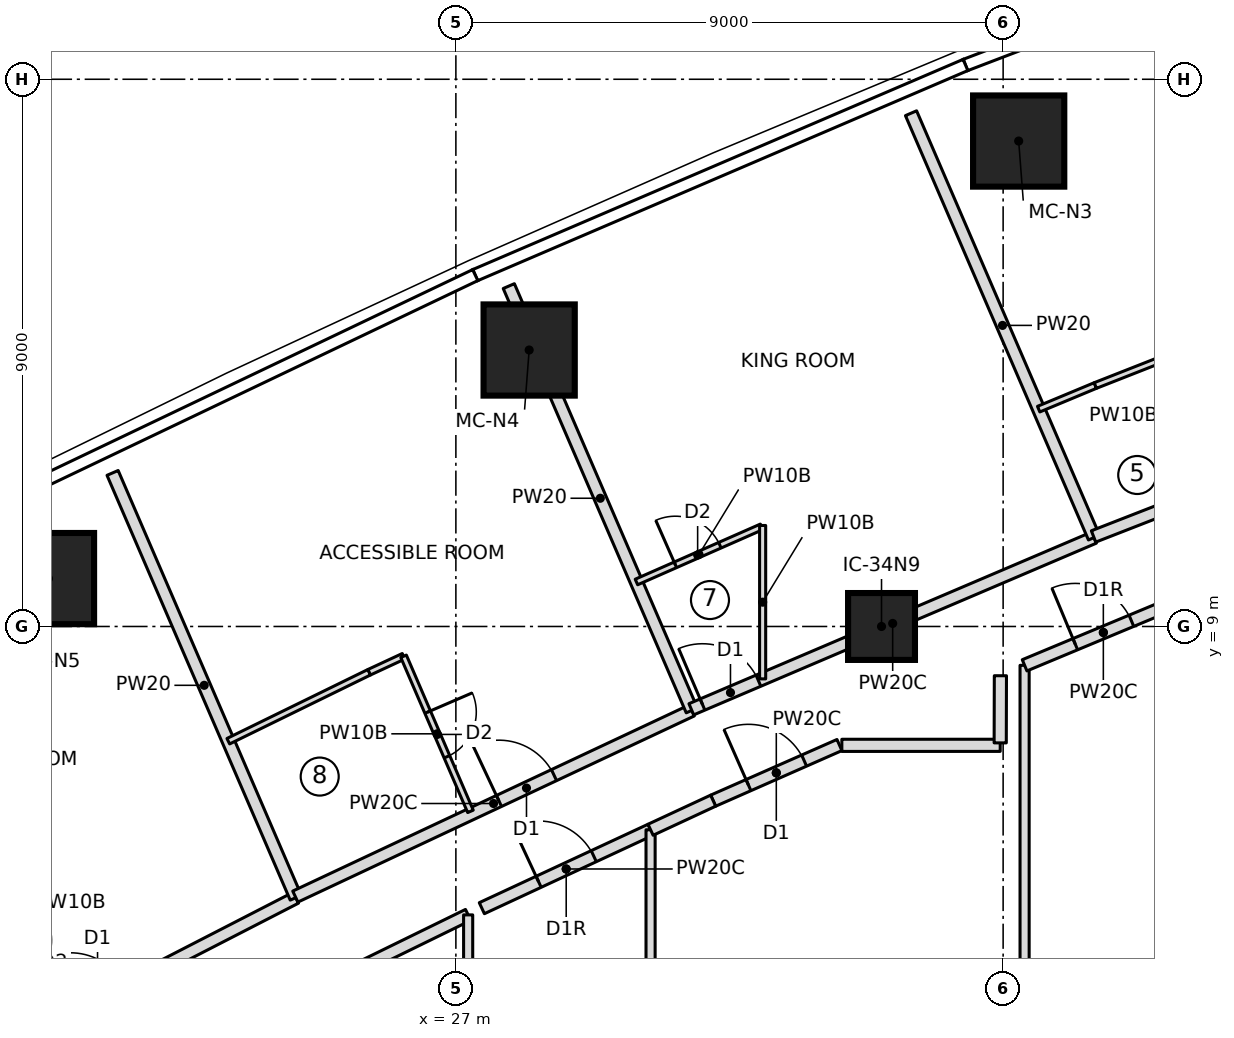
"""IFC4 building model, lengths in metres.
Left out: names, types, materials, properties, quantities, classifications, styles, units other than length and angle.
Written with IfcOpenShell. Run it as: python <this file> out.ifc"""

import sys

from ifc_helpers import new_model, si_unit, direction, frame, frame_2d, origin, origin_2d, place, context, subcontext, project, spatial, rectangle, extrude, element, fill, save


model = new_model("IFC4")
c1 = context("Model", 3, precision=1e-05, world=origin(), true_north=direction((0.0, 1.0)))
c2 = subcontext(c1, "Body", "Model", "MODEL_VIEW")
j1 = project(units=[si_unit("LENGTHUNIT", "METRE"), si_unit("PLANEANGLEUNIT", "RADIAN")], contexts=[c1])
p1 = place(None, origin())
s1 = spatial("IfcSite", under=j1, at=p1, CompositionType="ELEMENT")
p2 = place(p1, origin())
s2 = spatial("IfcBuilding", under=s1, at=p2, CompositionType="ELEMENT")
p3 = place(p2, frame((0.0, 0.0, 144.4)))
s3 = spatial("IfcBuildingStorey", under=s2, at=p3, CompositionType="ELEMENT", Elevation=144.4)
for number, where, z_axis, x_axis in (
    (1, (36.256, 16.984, 0.0), (0.0, 0.0, 1.0), (1.0, 0.0, 0.0)),
    (2, (28.205, 13.547, 0.0), (0.0, 0.0, 1.0), (1.0, 0.0, 0.0)),
    (3, (20.3, 9.788, 0.0), (0.0, 0.0, 1.0), (1.0, 0.0, 0.0)),
):
    element("IfcColumn", number, at=place(p3, frame(where, z_axis=z_axis, x_axis=x_axis)), inside=s3, PredefinedType="COLUMN", context=c2, shape_type="SweptSolid", body=[
        extrude(rectangle(XDim=1.5, YDim=1.5, at=origin_2d()), origin(), (0.0, 0.0, 1.0), 3.55),
    ])
p4 = place(p3, frame((34.0, 9.0, 0.0), z_axis=(0.0, 0.0, 1.0), x_axis=(1.0, 0.0, 0.0)))
e4 = element("IfcColumn", 4, at=p4, inside=s3, PredefinedType="COLUMN", context=c2, shape_type="SweptSolid", body=[
    extrude(rectangle(XDim=1.1, YDim=1.1, at=origin_2d()), origin(), (0.0, 0.0, 1.0), 3.55),
])
p5 = place(p3, frame((17.95, 1.238, 0.0), z_axis=(0.0, 0.0, 1.0), x_axis=(0.889253598622, 0.457414513694, 0.0)))
e5 = element("IfcWall", 5, at=p5, inside=s3, PredefinedType="PARTITIONING", context=c2, shape_type="SweptSolid", body=[
    extrude(rectangle(XDim=7.217, YDim=0.2, at=frame_2d((3.608, 0.0))), origin(), (0.0, 0.0, 1.0), 3.25),
])
p6 = place(p5, frame((3.05, 0.0, 0.0)))
e6 = element("IfcOpeningElement", 6, at=p6, cuts=e5, PredefinedType="OPENING", context=c2, shape_type="SweptSolid", body=[
    extrude(rectangle(XDim=1.0, YDim=2.1, at=frame_2d((0.5, 1.05))), frame((0.0, 0.11, 0.0), z_axis=(0.0, -1.0, 0.0), x_axis=(1.0, 0.0, 0.0)), (0.0, 0.0, 1.0), 0.22),
])
p7 = place(p3, frame((24.367, 4.539, 0.0), z_axis=(0.0, 0.0, 1.0), x_axis=(-0.395982367396, 0.918258114427, 0.0)))
e7 = element("IfcWall", 7, at=p7, inside=s3, PredefinedType="PARTITIONING", context=c2, shape_type="SweptSolid", body=[
    extrude(rectangle(XDim=7.609, YDim=0.2, at=frame_2d((3.804, 0.0))), origin(), (0.0, 0.0, 1.0), 3.25),
])
p8 = place(p3, frame((24.36, 4.557, 0.0), z_axis=(0.0, 0.0, 1.0), x_axis=(0.905157912263, 0.425075468439, 0.0)))
e8 = element("IfcWall", 8, at=p8, inside=s3, PredefinedType="PARTITIONING", context=c2, shape_type="SweptSolid", body=[
    extrude(rectangle(XDim=7.203, YDim=0.2, at=frame_2d((3.602, 0.0))), origin(), (0.0, 0.0, 1.0), 3.25),
])
p9 = place(p8, frame((3.7, 0.0, 0.0)))
e9 = element("IfcOpeningElement", 9, at=p9, cuts=e8, PredefinedType="OPENING", context=c2, shape_type="SweptSolid", body=[
    extrude(rectangle(XDim=1.0, YDim=2.1, at=frame_2d((0.5, 1.05))), frame((0.0, 0.11, 0.0), z_axis=(0.0, -1.0, 0.0), x_axis=(1.0, 0.0, 0.0)), (0.0, 0.0, 1.0), 0.22),
])
p10 = place(p3, frame((23.257, 7.113, 0.0), z_axis=(0.0, 0.0, 1.0), x_axis=(0.89814200952, 0.439705504555, 0.0)))
e10 = element("IfcWall", 10, at=p10, inside=s3, PredefinedType="PARTITIONING", context=c2, shape_type="SweptSolid", body=[
    extrude(rectangle(XDim=2.581, YDim=0.1, at=frame_2d((1.291, 0.0))), origin(), (0.0, 0.0, 1.0), 3.25),
])
p11 = place(p3, frame((25.575, 8.248, 0.0), z_axis=(0.0, 0.0, 1.0), x_axis=(0.906923333349, 0.421295700699, 0.0)))
e11 = element("IfcWall", 11, at=p11, inside=s3, PredefinedType="PARTITIONING", context=c2, shape_type="SweptSolid", body=[
    extrude(rectangle(XDim=0.622, YDim=0.1, at=frame_2d((0.311, 0.0))), origin(), (0.0, 0.0, 1.0), 3.25),
])
p12 = place(p3, frame((26.14, 8.51, 0.0), z_axis=(0.0, 0.0, 1.0), x_axis=(0.396018464604, -0.918242547311, 0.0)))
e12 = element("IfcWall", 12, at=p12, inside=s3, PredefinedType="PARTITIONING", context=c2, shape_type="SweptSolid", body=[
    extrude(rectangle(XDim=2.778, YDim=0.1, at=frame_2d((1.389, 0.0))), origin(), (0.0, 0.0, 1.0), 3.25),
])
p13 = place(p12, frame((1.0, 0.0, 0.0)))
e13 = element("IfcOpeningElement", 13, at=p13, cuts=e12, PredefinedType="OPENING", context=c2, shape_type="SweptSolid", body=[
    extrude(rectangle(XDim=0.8, YDim=2.1, at=frame_2d((0.4, 1.05))), frame((0.0, 0.06, 0.0), z_axis=(0.0, -1.0, 0.0), x_axis=(1.0, 0.0, 0.0)), (0.0, 0.0, 1.0), 0.12),
])
p14 = place(p3, frame((30.88, 7.619, 0.0), z_axis=(0.0, 0.0, 1.0), x_axis=(-0.395976934703, 0.91826045716, 0.0)))
e14 = element("IfcWall", 14, at=p14, inside=s3, PredefinedType="PARTITIONING", context=c2, shape_type="SweptSolid", body=[
    extrude(rectangle(XDim=7.6, YDim=0.2, at=frame_2d((3.8, 0.0))), origin(), (0.0, 0.0, 1.0), 3.25),
])
p15 = place(p3, frame((30.872, 7.638, 0.0), z_axis=(0.0, 0.0, 1.0), x_axis=(0.919834621271, 0.392306346509, 0.0)))
e15 = element("IfcWall", 15, at=p15, inside=s3, PredefinedType="PARTITIONING", context=c2, shape_type="SweptSolid", body=[
    extrude(rectangle(XDim=7.2, YDim=0.2, at=frame_2d((3.6, 0.0))), origin(), (0.0, 0.0, 1.0), 3.25),
])
p16 = place(p15, frame((0.2, 0.0, 0.0)))
e16 = element("IfcOpeningElement", 16, at=p16, cuts=e15, PredefinedType="OPENING", context=c2, shape_type="SweptSolid", body=[
    extrude(rectangle(XDim=1.0, YDim=2.1, at=frame_2d((0.5, 1.05))), frame((0.0, 0.11, 0.0), z_axis=(0.0, -1.0, 0.0), x_axis=(1.0, 0.0, 0.0)), (0.0, 0.0, 1.0), 0.22),
])
p17 = place(p3, frame((29.969, 9.731, 0.0), z_axis=(0.0, 0.0, 1.0), x_axis=(0.915118086658, 0.403185921719, 0.0)))
e17 = element("IfcWall", 17, at=p17, inside=s3, PredefinedType="PARTITIONING", context=c2, shape_type="SweptSolid", body=[
    extrude(rectangle(XDim=2.25, YDim=0.1, at=frame_2d((1.125, 0.0))), origin(), (0.0, 0.0, 1.0), 3.25),
])
p18 = place(p17, frame((0.7, 0.0, 0.0)))
e18 = element("IfcOpeningElement", 18, at=p18, cuts=e17, PredefinedType="OPENING", context=c2, shape_type="SweptSolid", body=[
    extrude(rectangle(XDim=0.8, YDim=2.1, at=frame_2d((0.4, 1.05))), frame((0.0, 0.06, 0.0), z_axis=(0.0, -1.0, 0.0), x_axis=(1.0, 0.0, 0.0)), (0.0, 0.0, 1.0), 0.12),
])
p19 = place(p3, frame((37.495, 10.462, 0.0), z_axis=(0.0, 0.0, 1.0), x_axis=(-0.396019423722, 0.918242133664, 0.0)))
e19 = element("IfcWall", 19, at=p19, inside=s3, PredefinedType="PARTITIONING", context=c2, shape_type="SweptSolid", body=[
    extrude(rectangle(XDim=7.601, YDim=0.2, at=frame_2d((3.8, 0.0))), origin(), (0.0, 0.0, 1.0), 3.25),
])
p20 = place(p3, frame((44.199, 13.098, 0.0), z_axis=(0.0, 0.0, 1.0), x_axis=(-0.931657652296, -0.363337334882, 0.0)))
e20 = element("IfcWall", 20, at=p20, inside=s3, PredefinedType="PARTITIONING", context=c2, shape_type="SweptSolid", body=[
    extrude(rectangle(XDim=7.205, YDim=0.2, at=frame_2d((3.602, 0.0))), origin(), (0.0, 0.0, 1.0), 3.25),
])
p21 = place(p20, frame((0.35, 0.0, 0.0)))
e21 = element("IfcOpeningElement", 21, at=p21, cuts=e20, PredefinedType="OPENING", context=c2, shape_type="SweptSolid", body=[
    extrude(rectangle(XDim=1.0, YDim=2.1, at=frame_2d((0.5, 1.05))), frame((0.0, 0.11, 0.0), z_axis=(0.0, -1.0, 0.0), x_axis=(1.0, 0.0, 0.0)), (0.0, 0.0, 1.0), 0.22),
])
p22 = place(p3, frame((36.584, 12.574, 0.0), z_axis=(0.0, 0.0, 1.0), x_axis=(0.923026834192, 0.384735575897, 0.0)))
e22 = element("IfcWall", 22, at=p22, inside=s3, PredefinedType="PARTITIONING", context=c2, shape_type="SweptSolid", body=[
    extrude(rectangle(XDim=1.01, YDim=0.1, at=frame_2d((0.505, 0.0))), origin(), (0.0, 0.0, 1.0), 3.25),
])
p23 = place(p3, frame((37.516, 12.963, 0.0), z_axis=(0.0, 0.0, 1.0), x_axis=(0.930584239012, 0.366077825199, 0.0)))
e23 = element("IfcWall", 23, at=p23, inside=s3, PredefinedType="PARTITIONING", context=c2, shape_type="SweptSolid", body=[
    extrude(rectangle(XDim=1.491, YDim=0.1, at=frame_2d((0.746, 0.0))), origin(), (0.0, 0.0, 1.0), 3.25),
])
p24 = place(p3, frame((23.659, 2.522, 0.0), z_axis=(0.0, 0.0, 1.0), x_axis=(0.898146009837, 0.439697333418, 0.0)))
e24 = element("IfcWall", 24, at=p24, inside=s3, PredefinedType="PARTITIONING", context=c2, shape_type="SweptSolid", body=[
    extrude(rectangle(XDim=3.945, YDim=0.2, at=frame_2d((1.973, 0.0))), origin(), (0.0, 0.0, 1.0), 3.25),
])
p25 = place(p3, frame((27.202, -4.257, 0.0), z_axis=(0.0, 0.0, 1.0), x_axis=(0.0, 1.0, 0.0)))
e25 = element("IfcWall", 25, at=p25, inside=s3, PredefinedType="PARTITIONING", context=c2, shape_type="SweptSolid", body=[
    extrude(rectangle(XDim=8.513, YDim=0.15, at=frame_2d((4.257, 0.0))), origin(), (0.0, 0.0, 1.0), 3.25),
])
p26 = place(p3, frame((27.427, 4.367, 0.0), z_axis=(0.0, 0.0, 1.0), x_axis=(0.906842391635, 0.42146990015, 0.0)))
e26 = element("IfcWall", 26, at=p26, inside=s3, PredefinedType="PARTITIONING", context=c2, shape_type="SweptSolid", body=[
    extrude(rectangle(XDim=3.06, YDim=0.2, at=frame_2d((1.53, 0.0))), origin(), (0.0, 0.0, 1.0), 3.25),
])
p27 = place(p26, frame((1.03, 0.0, 0.0)))
e27 = element("IfcOpeningElement", 27, at=p27, cuts=e26, PredefinedType="OPENING", context=c2, shape_type="SweptSolid", body=[
    extrude(rectangle(XDim=1.0, YDim=2.1, at=frame_2d((0.5, 1.05))), frame((0.0, 0.11, 0.0), z_axis=(0.0, -1.0, 0.0), x_axis=(1.0, 0.0, 0.0)), (0.0, 0.0, 1.0), 0.22),
])
p28 = place(p3, frame((30.202, -5.656, 0.0), z_axis=(0.0, 0.0, 1.0), x_axis=(0.0, 1.0, 0.0)))
e28 = element("IfcWall", 28, at=p28, inside=s3, PredefinedType="PARTITIONING", context=c2, shape_type="SweptSolid", body=[
    extrude(rectangle(XDim=11.313, YDim=0.15, at=frame_2d((5.656, 0.0))), origin(), (0.0, 0.0, 1.0), 3.25),
])
p29 = place(p3, frame((31.231, 6.135, 0.0), z_axis=(0.0, 0.0, 1.0), x_axis=(0.915102334452, 0.403221672881, 0.0)))
e29 = element("IfcWall", 29, at=p29, inside=s3, PredefinedType="PARTITIONING", context=c2, shape_type="SweptSolid", body=[
    extrude(rectangle(XDim=2.269, YDim=0.2, at=frame_2d((1.135, 0.0))), origin(), (0.0, 0.0, 1.0), 3.25),
])
p30 = place(p29, frame((0.635, 0.0, 0.0)))
e30 = element("IfcOpeningElement", 30, at=p30, cuts=e29, PredefinedType="OPENING", context=c2, shape_type="SweptSolid", body=[
    extrude(rectangle(XDim=1.0, YDim=2.1, at=frame_2d((0.5, 1.05))), frame((0.0, 0.11, 0.0), z_axis=(0.0, -1.0, 0.0), x_axis=(1.0, 0.0, 0.0)), (0.0, 0.0, 1.0), 0.22),
])
p31 = place(p3, frame((30.202, 5.656, 0.0), z_axis=(0.0, 0.0, 1.0), x_axis=(0.906797605575, 0.421566249271, 0.0)))
e31 = element("IfcWall", 31, at=p31, inside=s3, PredefinedType="PARTITIONING", context=c2, shape_type="SweptSolid", body=[
    extrude(rectangle(XDim=1.135, YDim=0.2, at=frame_2d((0.567, 0.0))), origin(), (0.0, 0.0, 1.0), 3.25),
])
p32 = place(p3, frame((36.353, -8.361, 0.0), z_axis=(0.0, 0.0, 1.0), x_axis=(0.0, 1.0, 0.0)))
e32 = element("IfcWall", 32, at=p32, inside=s3, PredefinedType="PARTITIONING", context=c2, shape_type="SweptSolid", body=[
    extrude(rectangle(XDim=16.722, YDim=0.15, at=frame_2d((8.361, 0.0))), origin(), (0.0, 0.0, 1.0), 3.25),
])
p33 = place(p3, frame((36.353, 8.361, 0.0), z_axis=(0.0, 0.0, 1.0), x_axis=(0.922997109092, 0.384806882224, 0.0)))
e33 = element("IfcWall", 33, at=p33, inside=s3, PredefinedType="PARTITIONING", context=c2, shape_type="SweptSolid", body=[
    extrude(rectangle(XDim=2.806, YDim=0.2, at=frame_2d((1.403, 0.0))), origin(), (0.0, 0.0, 1.0), 3.25),
])
p34 = place(p33, frame((0.903, 0.0, 0.0)))
e34 = element("IfcOpeningElement", 34, at=p34, cuts=e33, PredefinedType="OPENING", context=c2, shape_type="SweptSolid", body=[
    extrude(rectangle(XDim=1.0, YDim=2.1, at=frame_2d((0.5, 1.05))), frame((0.0, 0.11, 0.0), z_axis=(0.0, -1.0, 0.0), x_axis=(1.0, 0.0, 0.0)), (0.0, 0.0, 1.0), 0.22),
])
p35 = place(p3, frame((32.045, 10.661, 0.0), z_axis=(0.0, 0.0, 1.0), x_axis=(0.0, -1.0, 0.0)))
e35 = element("IfcWall", 35, at=p35, inside=s3, PredefinedType="PARTITIONING", context=c2, shape_type="SweptSolid", body=[
    extrude(rectangle(XDim=2.523, YDim=0.1, at=frame_2d((1.261, 0.0))), origin(), (0.0, 0.0, 1.0), 3.25),
])
p36 = place(p3, frame((33.347, 7.045, 0.0), z_axis=(0.0, 0.0, 1.0), x_axis=(0.999999982426, 0.000187476562, 0.0)))
e36 = element("IfcWall", 36, at=p36, inside=s3, PredefinedType="PARTITIONING", context=c2, shape_type="SweptSolid", body=[
    extrude(rectangle(XDim=2.604, YDim=0.2, at=frame_2d((1.302, 0.0))), origin(), (0.0, 0.0, 1.0), 3.25),
])
p37 = place(p3, frame((35.952, 7.085, 0.0), z_axis=(0.0, 0.0, 1.0), x_axis=(0.002873551354, 0.999995871343, 0.0)))
e37 = element("IfcWall", 37, at=p37, inside=s3, PredefinedType="PARTITIONING", context=c2, shape_type="SweptSolid", body=[
    extrude(rectangle(XDim=1.104, YDim=0.2, at=frame_2d((0.552, 0.0))), origin(), (0.0, 0.0, 1.0), 3.25),
])
p38 = place(p13, origin())
e38 = element("IfcDoor", 38, at=p38, inside=s3, OperationType="SINGLE_SWING_LEFT", PredefinedType="DOOR", context=c2, shape_type="SweptSolid", body=[
    extrude(rectangle(XDim=0.8, YDim=2.1, at=frame_2d((0.4, 1.05))), frame((0.0, 0.025, 0.0), z_axis=(0.0, -1.0, 0.0), x_axis=(1.0, 0.0, 0.0)), (0.0, 0.0, 1.0), 0.05),
])
fill(e13, e38)
p39 = place(p9, origin())
e39 = element("IfcDoor", 39, at=p39, inside=s3, OperationType="SINGLE_SWING_LEFT", PredefinedType="DOOR", context=c2, shape_type="SweptSolid", body=[
    extrude(rectangle(XDim=1.0, YDim=2.1, at=frame_2d((0.5, 1.05))), frame((0.0, 0.025, 0.0), z_axis=(0.0, -1.0, 0.0), x_axis=(1.0, 0.0, 0.0)), (0.0, 0.0, 1.0), 0.05),
])
fill(e9, e39)
p40 = place(p18, origin())
e40 = element("IfcDoor", 40, at=p40, inside=s3, OperationType="SINGLE_SWING_LEFT", PredefinedType="DOOR", context=c2, shape_type="SweptSolid", body=[
    extrude(rectangle(XDim=0.8, YDim=2.1, at=frame_2d((0.4, 1.05))), frame((0.0, 0.025, 0.0), z_axis=(0.0, -1.0, 0.0), x_axis=(1.0, 0.0, 0.0)), (0.0, 0.0, 1.0), 0.05),
])
fill(e18, e40)
p41 = place(p16, origin())
e41 = element("IfcDoor", 41, at=p41, inside=s3, OperationType="SINGLE_SWING_LEFT", PredefinedType="DOOR", context=c2, shape_type="SweptSolid", body=[
    extrude(rectangle(XDim=1.0, YDim=2.1, at=frame_2d((0.5, 1.05))), frame((0.0, 0.025, 0.0), z_axis=(0.0, -1.0, 0.0), x_axis=(1.0, 0.0, 0.0)), (0.0, 0.0, 1.0), 0.05),
])
fill(e16, e41)
p42 = place(p27, origin())
e42 = element("IfcDoor", 42, at=p42, inside=s3, OperationType="SINGLE_SWING_RIGHT", PredefinedType="DOOR", context=c2, shape_type="SweptSolid", body=[
    extrude(rectangle(XDim=1.0, YDim=2.1, at=frame_2d((0.5, 1.05))), frame((0.0, 0.025, 0.0), z_axis=(0.0, -1.0, 0.0), x_axis=(1.0, 0.0, 0.0)), (0.0, 0.0, 1.0), 0.05),
])
fill(e27, e42)
p43 = place(p30, origin())
e43 = element("IfcDoor", 43, at=p43, inside=s3, OperationType="SINGLE_SWING_LEFT", PredefinedType="DOOR", context=c2, shape_type="SweptSolid", body=[
    extrude(rectangle(XDim=1.0, YDim=2.1, at=frame_2d((0.5, 1.05))), frame((0.0, 0.025, 0.0), z_axis=(0.0, -1.0, 0.0), x_axis=(1.0, 0.0, 0.0)), (0.0, 0.0, 1.0), 0.05),
])
fill(e30, e43)
p44 = place(p34, origin())
e44 = element("IfcDoor", 44, at=p44, inside=s3, OperationType="SINGLE_SWING_RIGHT", PredefinedType="DOOR", context=c2, shape_type="SweptSolid", body=[
    extrude(rectangle(XDim=1.0, YDim=2.1, at=frame_2d((0.5, 1.05))), frame((0.0, 0.025, 0.0), z_axis=(0.0, -1.0, 0.0), x_axis=(1.0, 0.0, 0.0)), (0.0, 0.0, 1.0), 0.05),
])
fill(e34, e44)
save(model, sys.argv[1])
